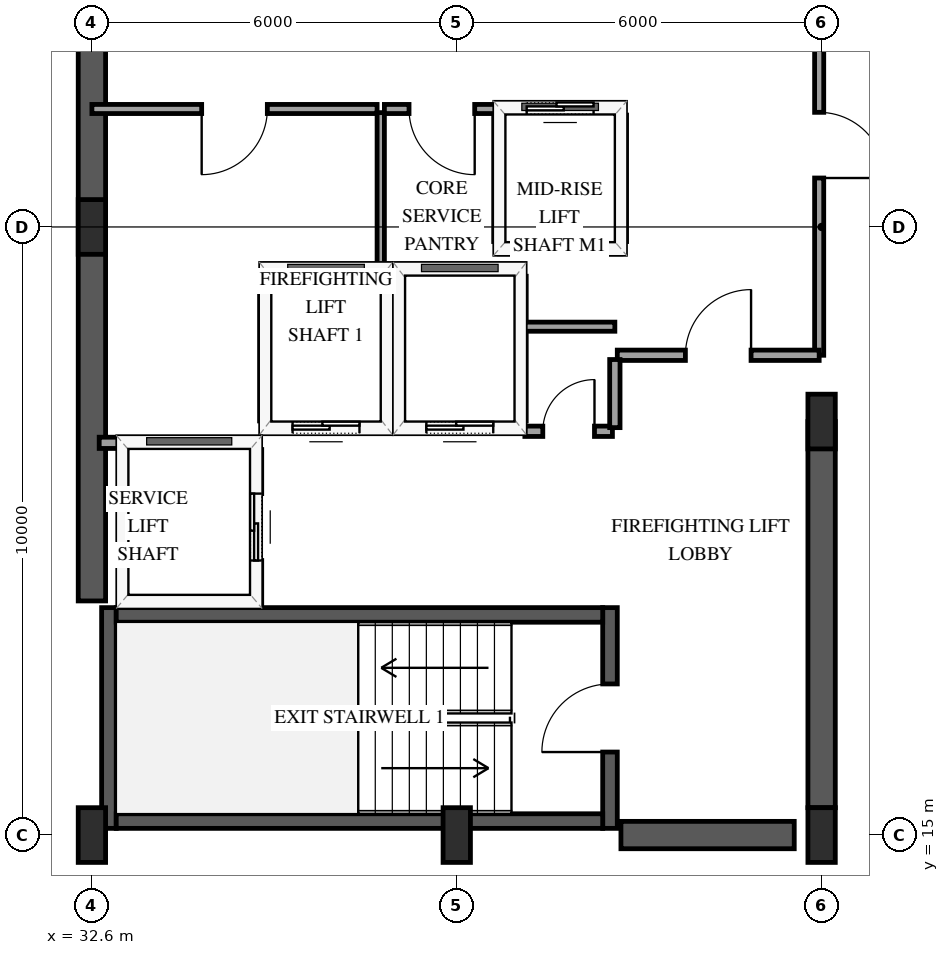
"""IFC4 building model, lengths in metres.
Left out: names, types, materials, properties, quantities, classifications, styles, units other than length and angle.
Written with IfcOpenShell. Run it as: python <this file> out.ifc"""

import sys

from ifc_helpers import new_model, si_unit, direction, frame, frame_2d, origin, origin_2d, place, context, subcontext, project, spatial, rectangle, extrude, element, fill, save


model = new_model("IFC4")
c1 = context("Model", 3, precision=1e-05, world=origin(), true_north=direction((0.0, 1.0)))
c2 = subcontext(c1, "Body", "Model", "MODEL_VIEW")
j1 = project(units=[si_unit("LENGTHUNIT", "METRE"), si_unit("PLANEANGLEUNIT", "RADIAN")], contexts=[c1])
p1 = place(None, origin())
s1 = spatial("IfcSite", under=j1, at=p1, CompositionType="ELEMENT")
p2 = place(p1, origin())
s2 = spatial("IfcBuilding", under=s1, at=p2, CompositionType="ELEMENT")
p3 = place(p2, frame((0.0, 0.0, 212.2)))
s3 = spatial("IfcBuildingStorey", under=s2, at=p3, CompositionType="ELEMENT", Elevation=212.2)
p4 = place(p3, frame((32.88, 15.11, 0.0), z_axis=(0.0, 0.0, 1.0), x_axis=(0.0, 1.0, 0.0)))
e1 = element("IfcWall", 1, at=p4, inside=s3, PredefinedType="SHEAR", context=c2, shape_type="SweptSolid", body=[
    extrude(rectangle(XDim=3.63, YDim=0.24, at=frame_2d((1.815, 0.0))), origin(), (0.0, 0.0, 1.0), 3.6),
])
p5 = place(p3, frame((41.12, 15.11, 0.0), z_axis=(0.0, 0.0, 1.0), x_axis=(0.0, 1.0, 0.0)))
e2 = element("IfcWall", 2, at=p5, inside=s3, PredefinedType="SHEAR", context=c2, shape_type="SweptSolid", body=[
    extrude(rectangle(XDim=3.63, YDim=0.24, at=frame_2d((1.815, 0.0))), origin(), (0.0, 0.0, 1.0), 3.6),
])
p6 = place(p5, frame((1.255, 0.0, 0.0)))
e3 = element("IfcOpeningElement", 3, at=p6, cuts=e2, PredefinedType="OPENING", context=c2, shape_type="SweptSolid", body=[
    extrude(rectangle(XDim=1.12, YDim=2.15, at=frame_2d((0.56, 1.075))), frame((0.0, 0.13, 0.0), z_axis=(0.0, -1.0, 0.0), x_axis=(1.0, 0.0, 0.0)), (0.0, 0.0, 1.0), 0.26),
])
for number, where, z_axis, x_axis in (
    (4, (33.0, 15.23, 0.0), (0.0, 0.0, 1.0), (1.0, 0.0, 0.0)),
    (5, (33.0, 18.62, 0.0), (0.0, 0.0, 1.0), (1.0, 0.0, 0.0)),
):
    element("IfcWall", number, at=place(p3, frame(where, z_axis=z_axis, x_axis=x_axis)), inside=s3, PredefinedType="SHEAR", context=c2, shape_type="SweptSolid", body=[
        extrude(rectangle(XDim=8.0, YDim=0.24, at=frame_2d((4.0, 0.0))), origin(), (0.0, 0.0, 1.0), 3.6),
    ])
p7 = place(p3, frame((32.6, 18.85, 0.0), z_axis=(0.0, 0.0, 1.0), x_axis=(0.0, 1.0, 0.0)))
e6 = element("IfcWall", 6, at=p7, inside=s3, PredefinedType="SHEAR", context=c2, shape_type="SweptSolid", body=[
    extrude(rectangle(XDim=12.3, YDim=0.45, at=frame_2d((6.15, 0.0))), origin(), (0.0, 0.0, 1.0), 3.6),
])
p8 = place(p3, frame((41.3, 15.0, 0.0), z_axis=(0.0, 0.0, 1.0), x_axis=(1.0, 0.0, 0.0)))
e7 = element("IfcWall", 7, at=p8, inside=s3, PredefinedType="SHEAR", context=c2, shape_type="SweptSolid", body=[
    extrude(rectangle(XDim=2.85, YDim=0.45, at=frame_2d((1.425, 0.0))), origin(), (0.0, 0.0, 1.0), 3.6),
])
p9 = place(p3, frame((44.6, 15.45, 0.0), z_axis=(0.0, 0.0, 1.0), x_axis=(0.0, 1.0, 0.0)))
e8 = element("IfcWall", 8, at=p9, inside=s3, PredefinedType="SHEAR", context=c2, shape_type="SweptSolid", body=[
    extrude(rectangle(XDim=6.35, YDim=0.45, at=frame_2d((3.175, 0.0))), origin(), (0.0, 0.0, 1.0), 3.6),
])
for number, where, z_axis, x_axis in (
    (9, (32.6, 15.0, 0.0), (0.0, 0.0, 1.0), (1.0, 0.0, 0.0)),
    (10, (32.6, 25.0, 0.0), (0.0, 0.0, 1.0), (1.0, 0.0, 0.0)),
    (11, (38.6, 15.0, 0.0), (0.0, 0.0, 1.0), (1.0, 0.0, 0.0)),
    (12, (44.6, 15.0, 0.0), (0.0, 0.0, 1.0), (1.0, 0.0, 0.0)),
    (13, (44.6, 21.8, 0.0), (0.0, 0.0, 1.0), (1.0, 0.0, 0.0)),
):
    element("IfcColumn", number, at=place(p3, frame(where, z_axis=z_axis, x_axis=x_axis)), inside=s3, PredefinedType="PILASTER", context=c2, shape_type="SweptSolid", body=[
        extrude(rectangle(XDim=0.45, YDim=0.9, at=origin_2d()), origin(), (0.0, 0.0, 1.0), 3.6),
    ])
p10 = place(p3, frame((35.45, 21.7, 0.0), z_axis=(0.0, 0.0, 1.0), x_axis=(1.0, 0.0, 0.0)))
e14 = element("IfcWall", 14, at=p10, inside=s3, PredefinedType="SOLIDWALL", context=c2, shape_type="SweptSolid", body=[
    extrude(rectangle(XDim=2.0, YDim=0.185, at=frame_2d((1.0, 0.0))), origin(), (0.0, 0.0, 1.0), 3.3),
])
p11 = place(p10, frame((0.45, 0.0, 0.0)))
e15 = element("IfcOpeningElement", 15, at=p11, cuts=e14, PredefinedType="OPENING", context=c2, shape_type="SweptSolid", body=[
    extrude(rectangle(XDim=1.1, YDim=2.15, at=frame_2d((0.55, 1.075))), frame((0.0, 0.103, 0.0), z_axis=(0.0, -1.0, 0.0), x_axis=(1.0, 0.0, 0.0)), (0.0, 0.0, 1.0), 0.205),
])
p12 = place(p3, frame((35.45, 24.3, 0.0), z_axis=(0.0, 0.0, 1.0), x_axis=(1.0, 0.0, 0.0)))
e16 = element("IfcWall", 16, at=p12, inside=s3, PredefinedType="SOLIDWALL", context=c2, shape_type="SweptSolid", body=[
    extrude(rectangle(XDim=2.0, YDim=0.185, at=frame_2d((1.0, 0.0))), origin(), (0.0, 0.0, 1.0), 3.3),
])
for number, where, z_axis, x_axis in (
    (17, (35.45, 21.81, 0.0), (0.0, 0.0, 1.0), (0.0, 1.0, 0.0)),
    (18, (37.45, 21.81, 0.0), (0.0, 0.0, 1.0), (0.0, 1.0, 0.0)),
):
    element("IfcWall", number, at=place(p3, frame(where, z_axis=z_axis, x_axis=x_axis)), inside=s3, PredefinedType="SOLIDWALL", context=c2, shape_type="SweptSolid", body=[
        extrude(rectangle(XDim=2.38, YDim=0.185, at=frame_2d((1.19, 0.0))), origin(), (0.0, 0.0, 1.0), 3.3),
    ])
p13 = place(p3, frame((37.65, 21.7, 0.0), z_axis=(0.0, 0.0, 1.0), x_axis=(1.0, 0.0, 0.0)))
e19 = element("IfcWall", 19, at=p13, inside=s3, PredefinedType="SOLIDWALL", context=c2, shape_type="SweptSolid", body=[
    extrude(rectangle(XDim=2.0, YDim=0.185, at=frame_2d((1.0, 0.0))), origin(), (0.0, 0.0, 1.0), 3.3),
])
p14 = place(p13, frame((0.45, 0.0, 0.0)))
e20 = element("IfcOpeningElement", 20, at=p14, cuts=e19, PredefinedType="OPENING", context=c2, shape_type="SweptSolid", body=[
    extrude(rectangle(XDim=1.1, YDim=2.15, at=frame_2d((0.55, 1.075))), frame((0.0, 0.103, 0.0), z_axis=(0.0, -1.0, 0.0), x_axis=(1.0, 0.0, 0.0)), (0.0, 0.0, 1.0), 0.205),
])
p15 = place(p3, frame((37.65, 24.3, 0.0), z_axis=(0.0, 0.0, 1.0), x_axis=(1.0, 0.0, 0.0)))
e21 = element("IfcWall", 21, at=p15, inside=s3, PredefinedType="SOLIDWALL", context=c2, shape_type="SweptSolid", body=[
    extrude(rectangle(XDim=2.0, YDim=0.185, at=frame_2d((1.0, 0.0))), origin(), (0.0, 0.0, 1.0), 3.3),
])
p16 = place(p3, frame((39.65, 21.81, 0.0), z_axis=(0.0, 0.0, 1.0), x_axis=(0.0, 1.0, 0.0)))
e22 = element("IfcWall", 22, at=p16, inside=s3, PredefinedType="SOLIDWALL", context=c2, shape_type="SweptSolid", body=[
    extrude(rectangle(XDim=2.38, YDim=0.185, at=frame_2d((1.19, 0.0))), origin(), (0.0, 0.0, 1.0), 3.3),
])
p17 = place(p3, frame((32.72, 21.45, 0.0), z_axis=(0.0, 0.0, 1.0), x_axis=(1.0, 0.0, 0.0)))
e23 = element("IfcWall", 23, at=p17, inside=s3, PredefinedType="SOLIDWALL", context=c2, shape_type="SweptSolid", body=[
    extrude(rectangle(XDim=2.58, YDim=0.185, at=frame_2d((1.29, 0.0))), origin(), (0.0, 0.0, 1.0), 3.3),
])
p18 = place(p3, frame((35.3, 18.79, 0.0), z_axis=(0.0, 0.0, 1.0), x_axis=(0.0, 1.0, 0.0)))
e24 = element("IfcWall", 24, at=p18, inside=s3, PredefinedType="SOLIDWALL", context=c2, shape_type="SweptSolid", body=[
    extrude(rectangle(XDim=2.55, YDim=0.185, at=frame_2d((1.275, 0.0))), origin(), (0.0, 0.0, 1.0), 3.3),
])
p19 = place(p18, frame((0.725, 0.0, 0.0)))
e25 = element("IfcOpeningElement", 25, at=p19, cuts=e24, PredefinedType="OPENING", context=c2, shape_type="SweptSolid", body=[
    extrude(rectangle(XDim=1.1, YDim=2.15, at=frame_2d((0.55, 1.075))), frame((0.0, 0.103, 0.0), z_axis=(0.0, -1.0, 0.0), x_axis=(1.0, 0.0, 0.0)), (0.0, 0.0, 1.0), 0.205),
])
p20 = place(p3, frame((39.3, 24.65, 0.0), z_axis=(0.0, 0.0, 1.0), x_axis=(1.0, 0.0, 0.0)))
e26 = element("IfcWall", 26, at=p20, inside=s3, PredefinedType="SOLIDWALL", context=c2, shape_type="SweptSolid", body=[
    extrude(rectangle(XDim=2.0, YDim=0.185, at=frame_2d((1.0, 0.0))), origin(), (0.0, 0.0, 1.0), 3.3),
])
p21 = place(p3, frame((39.3, 26.95, 0.0), z_axis=(0.0, 0.0, 1.0), x_axis=(1.0, 0.0, 0.0)))
e27 = element("IfcWall", 27, at=p21, inside=s3, PredefinedType="SOLIDWALL", context=c2, shape_type="SweptSolid", body=[
    extrude(rectangle(XDim=2.0, YDim=0.185, at=frame_2d((1.0, 0.0))), origin(), (0.0, 0.0, 1.0), 3.3),
])
p22 = place(p21, frame((0.45, 0.0, 0.0)))
e28 = element("IfcOpeningElement", 28, at=p22, cuts=e27, PredefinedType="OPENING", context=c2, shape_type="SweptSolid", body=[
    extrude(rectangle(XDim=1.1, YDim=2.15, at=frame_2d((0.55, 1.075))), frame((0.0, 0.103, 0.0), z_axis=(0.0, -1.0, 0.0), x_axis=(1.0, 0.0, 0.0)), (0.0, 0.0, 1.0), 0.205),
])
for number, where, z_axis, x_axis in (
    (29, (39.3, 24.76, 0.0), (0.0, 0.0, 1.0), (0.0, 1.0, 0.0)),
    (30, (41.3, 24.76, 0.0), (0.0, 0.0, 1.0), (0.0, 1.0, 0.0)),
):
    element("IfcWall", number, at=place(p3, frame(where, z_axis=z_axis, x_axis=x_axis)), inside=s3, PredefinedType="SOLIDWALL", context=c2, shape_type="SweptSolid", body=[
        extrude(rectangle(XDim=2.08, YDim=0.185, at=frame_2d((1.04, 0.0))), origin(), (0.0, 0.0, 1.0), 3.3),
    ])
p23 = place(p3, frame((44.56, 29.8, 0.0), z_axis=(0.0, 0.0, 1.0), x_axis=(0.0, -1.0, 0.0)))
e31 = element("IfcWall", 31, at=p23, inside=s3, PredefinedType="PARTITIONING", context=c2, shape_type="SweptSolid", body=[
    extrude(rectangle(XDim=6.91, YDim=0.15, at=frame_2d((3.455, 0.0))), origin(), (0.0, 0.0, 1.0), 2.34),
])
p24 = place(p23, frame((2.915, 0.0, 0.0)))
e32 = element("IfcOpeningElement", 32, at=p24, cuts=e31, PredefinedType="OPENING", context=c2, shape_type="SweptSolid", body=[
    extrude(rectangle(XDim=1.08, YDim=2.15, at=frame_2d((0.54, 1.075))), frame((0.0, 0.085, 0.0), z_axis=(0.0, -1.0, 0.0), x_axis=(1.0, 0.0, 0.0)), (0.0, 0.0, 1.0), 0.17),
])
p25 = place(p3, frame((37.29, 26.94, 0.0), z_axis=(0.0, 0.0, 1.0), x_axis=(-1.0, 0.0, 0.0)))
e33 = element("IfcWall", 33, at=p25, inside=s3, PredefinedType="PARTITIONING", context=c2, shape_type="SweptSolid", body=[
    extrude(rectangle(XDim=4.69, YDim=0.15, at=frame_2d((2.345, 0.0))), origin(), (0.0, 0.0, 1.0), 3.3),
])
p26 = place(p25, frame((1.805, 0.0, 0.0)))
e34 = element("IfcOpeningElement", 34, at=p26, cuts=e33, PredefinedType="OPENING", context=c2, shape_type="SweptSolid", body=[
    extrude(rectangle(XDim=1.08, YDim=2.15, at=frame_2d((0.54, 1.075))), frame((0.0, 0.085, 0.0), z_axis=(0.0, -1.0, 0.0), x_axis=(1.0, 0.0, 0.0)), (0.0, 0.0, 1.0), 0.17),
])
p27 = place(p3, frame((41.24, 22.89, 0.0), z_axis=(0.0, 0.0, 1.0), x_axis=(1.0, 0.0, 0.0)))
e35 = element("IfcWall", 35, at=p27, inside=s3, PredefinedType="PARTITIONING", context=c2, shape_type="SweptSolid", body=[
    extrude(rectangle(XDim=3.32, YDim=0.17, at=frame_2d((1.66, 0.0))), origin(), (0.0, 0.0, 1.0), 3.3),
])
p28 = place(p27, frame((1.12, 0.0, 0.0)))
e36 = element("IfcOpeningElement", 36, at=p28, cuts=e35, PredefinedType="OPENING", context=c2, shape_type="SweptSolid", body=[
    extrude(rectangle(XDim=1.08, YDim=2.15, at=frame_2d((0.54, 1.075))), frame((0.0, 0.095, 0.0), z_axis=(0.0, -1.0, 0.0), x_axis=(1.0, 0.0, 0.0)), (0.0, 0.0, 1.0), 0.19),
])
p29 = place(p3, frame((37.35, 26.88, 0.0), z_axis=(0.0, 0.0, 1.0), x_axis=(0.0, -1.0, 0.0)))
e37 = element("IfcWall", 37, at=p29, inside=s3, PredefinedType="PARTITIONING", context=c2, shape_type="SweptSolid", body=[
    extrude(rectangle(XDim=2.58, YDim=0.12, at=frame_2d((1.29, 0.0))), origin(), (0.0, 0.0, 1.0), 3.3),
])
p30 = place(p3, frame((39.3, 26.94, 0.0), z_axis=(0.0, 0.0, 1.0), x_axis=(-1.0, 0.0, 0.0)))
e38 = element("IfcWall", 38, at=p30, inside=s3, PredefinedType="PARTITIONING", context=c2, shape_type="SweptSolid", body=[
    extrude(rectangle(XDim=1.89, YDim=0.15, at=frame_2d((0.945, 0.0))), origin(), (0.0, 0.0, 1.0), 3.3),
])
p31 = place(p30, frame((0.405, 0.0, 0.0)))
e39 = element("IfcOpeningElement", 39, at=p31, cuts=e38, PredefinedType="OPENING", context=c2, shape_type="SweptSolid", body=[
    extrude(rectangle(XDim=1.08, YDim=2.15, at=frame_2d((0.54, 1.075))), frame((0.0, 0.085, 0.0), z_axis=(0.0, -1.0, 0.0), x_axis=(1.0, 0.0, 0.0)), (0.0, 0.0, 1.0), 0.17),
])
p32 = place(p3, frame((39.72, 21.64, 0.0), z_axis=(0.0, 0.0, 1.0), x_axis=(1.0, 0.0, 0.0)))
e40 = element("IfcWall", 40, at=p32, inside=s3, PredefinedType="PARTITIONING", context=c2, shape_type="SweptSolid", body=[
    extrude(rectangle(XDim=1.44, YDim=0.17, at=frame_2d((0.72, 0.0))), origin(), (0.0, 0.0, 1.0), 3.3),
])
p33 = place(p32, frame((0.295, 0.0, 0.0)))
e41 = element("IfcOpeningElement", 41, at=p33, cuts=e40, PredefinedType="OPENING", context=c2, shape_type="SweptSolid", body=[
    extrude(rectangle(XDim=0.85, YDim=2.1, at=frame_2d((0.425, 1.05))), frame((0.0, 0.095, 0.0), z_axis=(0.0, -1.0, 0.0), x_axis=(1.0, 0.0, 0.0)), (0.0, 0.0, 1.0), 0.19),
])
p34 = place(p3, frame((41.2, 21.7, 0.0), z_axis=(0.0, 0.0, 1.0), x_axis=(0.0, 1.0, 0.0)))
e42 = element("IfcWall", 42, at=p34, inside=s3, PredefinedType="PARTITIONING", context=c2, shape_type="SweptSolid", body=[
    extrude(rectangle(XDim=1.12, YDim=0.17, at=frame_2d((0.56, 0.0))), origin(), (0.0, 0.0, 1.0), 3.3),
])
p35 = place(p3, frame((41.2, 23.36, 0.0), z_axis=(0.0, 0.0, 1.0), x_axis=(-1.0, 0.0, 0.0)))
e43 = element("IfcWall", 43, at=p35, inside=s3, PredefinedType="PARTITIONING", context=c2, shape_type="SweptSolid", body=[
    extrude(rectangle(XDim=1.48, YDim=0.15, at=frame_2d((0.74, 0.0))), origin(), (0.0, 0.0, 1.0), 3.3),
])
p36 = place(p11, origin())
e44 = element("IfcDoor", 44, at=p36, inside=s3, OperationType="SLIDING_TO_LEFT", PredefinedType="DOOR", context=c2, shape_type="SweptSolid", body=[
    extrude(rectangle(XDim=1.1, YDim=2.15, at=frame_2d((0.55, 1.075))), frame((0.0, 0.025, 0.0), z_axis=(0.0, -1.0, 0.0), x_axis=(1.0, 0.0, 0.0)), (0.0, 0.0, 1.0), 0.05),
])
fill(e15, e44)
p37 = place(p14, origin())
e45 = element("IfcDoor", 45, at=p37, inside=s3, OperationType="SLIDING_TO_LEFT", PredefinedType="DOOR", context=c2, shape_type="SweptSolid", body=[
    extrude(rectangle(XDim=1.1, YDim=2.15, at=frame_2d((0.55, 1.075))), frame((0.0, 0.025, 0.0), z_axis=(0.0, -1.0, 0.0), x_axis=(1.0, 0.0, 0.0)), (0.0, 0.0, 1.0), 0.05),
])
fill(e20, e45)
p38 = place(p19, origin())
e46 = element("IfcDoor", 46, at=p38, inside=s3, OperationType="SLIDING_TO_LEFT", PredefinedType="DOOR", context=c2, shape_type="SweptSolid", body=[
    extrude(rectangle(XDim=1.1, YDim=2.15, at=frame_2d((0.55, 1.075))), frame((0.0, 0.025, 0.0), z_axis=(0.0, -1.0, 0.0), x_axis=(1.0, 0.0, 0.0)), (0.0, 0.0, 1.0), 0.05),
])
fill(e25, e46)
p39 = place(p22, origin())
e47 = element("IfcDoor", 47, at=p39, inside=s3, OperationType="SLIDING_TO_LEFT", PredefinedType="DOOR", context=c2, shape_type="SweptSolid", body=[
    extrude(rectangle(XDim=1.1, YDim=2.15, at=frame_2d((0.55, 1.075))), frame((0.0, 0.025, 0.0), z_axis=(0.0, -1.0, 0.0), x_axis=(1.0, 0.0, 0.0)), (0.0, 0.0, 1.0), 0.05),
])
fill(e28, e47)
p40 = place(p6, origin())
e48 = element("IfcDoor", 48, at=p40, inside=s3, OperationType="SINGLE_SWING_LEFT", PredefinedType="DOOR", context=c2, shape_type="SweptSolid", body=[
    extrude(rectangle(XDim=1.12, YDim=2.15, at=frame_2d((0.56, 1.075))), frame((0.0, 0.025, 0.0), z_axis=(0.0, -1.0, 0.0), x_axis=(1.0, 0.0, 0.0)), (0.0, 0.0, 1.0), 0.05),
])
fill(e3, e48)
p41 = place(p24, origin())
e49 = element("IfcDoor", 49, at=p41, inside=s3, OperationType="SINGLE_SWING_RIGHT", PredefinedType="DOOR", context=c2, shape_type="SweptSolid", body=[
    extrude(rectangle(XDim=1.08, YDim=2.15, at=frame_2d((0.54, 1.075))), frame((0.0, 0.025, 0.0), z_axis=(0.0, -1.0, 0.0), x_axis=(1.0, 0.0, 0.0)), (0.0, 0.0, 1.0), 0.05),
])
fill(e32, e49)
p42 = place(p26, origin())
e50 = element("IfcDoor", 50, at=p42, inside=s3, OperationType="SINGLE_SWING_RIGHT", PredefinedType="DOOR", context=c2, shape_type="SweptSolid", body=[
    extrude(rectangle(XDim=1.08, YDim=2.15, at=frame_2d((0.54, 1.075))), frame((0.0, 0.025, 0.0), z_axis=(0.0, -1.0, 0.0), x_axis=(1.0, 0.0, 0.0)), (0.0, 0.0, 1.0), 0.05),
])
fill(e34, e50)
p43 = place(p28, origin())
e51 = element("IfcDoor", 51, at=p43, inside=s3, OperationType="SINGLE_SWING_RIGHT", PredefinedType="DOOR", context=c2, shape_type="SweptSolid", body=[
    extrude(rectangle(XDim=1.08, YDim=2.15, at=frame_2d((0.54, 1.075))), frame((0.0, 0.025, 0.0), z_axis=(0.0, -1.0, 0.0), x_axis=(1.0, 0.0, 0.0)), (0.0, 0.0, 1.0), 0.05),
])
fill(e36, e51)
p44 = place(p31, origin())
e52 = element("IfcDoor", 52, at=p44, inside=s3, OperationType="SINGLE_SWING_LEFT", PredefinedType="DOOR", context=c2, shape_type="SweptSolid", body=[
    extrude(rectangle(XDim=1.08, YDim=2.15, at=frame_2d((0.54, 1.075))), frame((0.0, 0.025, 0.0), z_axis=(0.0, -1.0, 0.0), x_axis=(1.0, 0.0, 0.0)), (0.0, 0.0, 1.0), 0.05),
])
fill(e39, e52)
p45 = place(p33, origin())
e53 = element("IfcDoor", 53, at=p45, inside=s3, OperationType="SINGLE_SWING_RIGHT", PredefinedType="DOOR", context=c2, shape_type="SweptSolid", body=[
    extrude(rectangle(XDim=0.85, YDim=2.1, at=frame_2d((0.425, 1.05))), frame((0.0, 0.025, 0.0), z_axis=(0.0, -1.0, 0.0), x_axis=(1.0, 0.0, 0.0)), (0.0, 0.0, 1.0), 0.05),
])
fill(e41, e53)
save(model, sys.argv[1])
